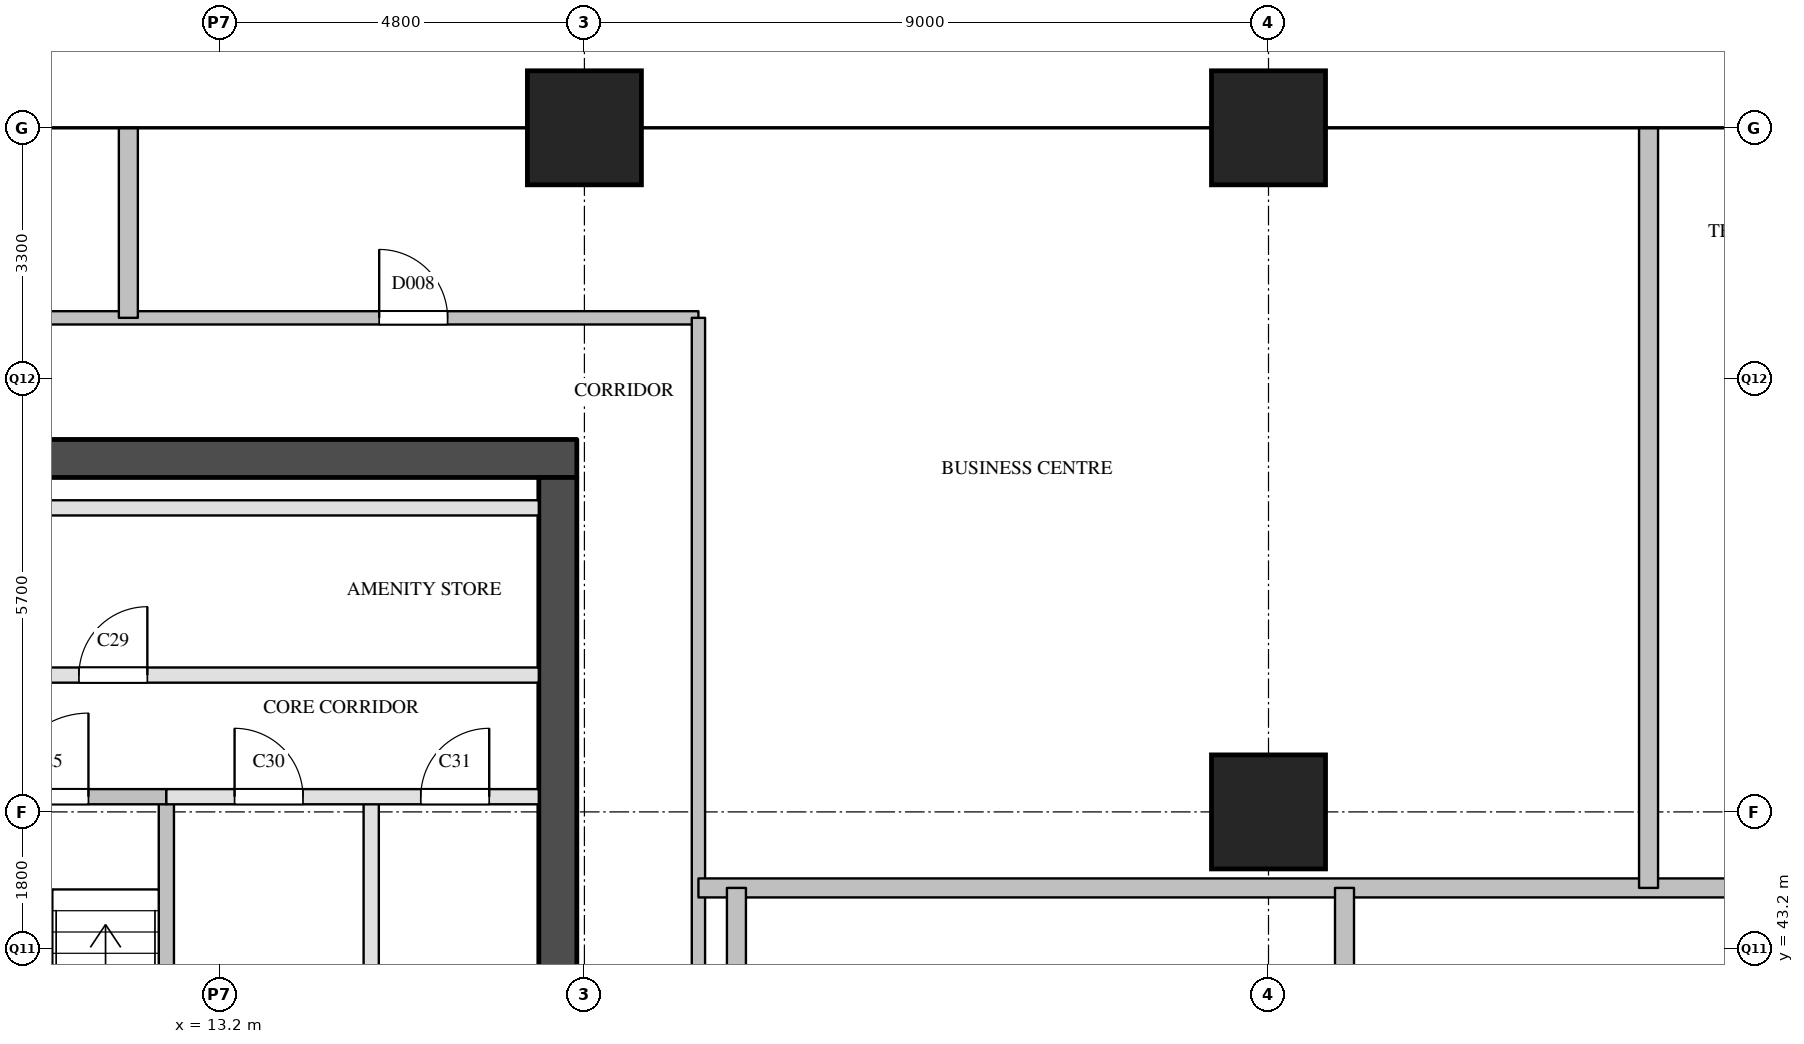
"""IFC4 building model, lengths in metres.
Left out: names, types, materials, properties, quantities, classifications, styles, units other than length and angle.
Written with IfcOpenShell. Run it as: python <this file> out.ifc"""

import sys

from ifc_helpers import new_model, si_unit, direction, frame, frame_2d, origin, origin_2d, place, context, subcontext, project, spatial, rectangle, extrude, element, fill, save


model = new_model("IFC4")
c1 = context("Model", 3, precision=1e-05, world=origin(), true_north=direction((0.0, 1.0)))
c2 = subcontext(c1, "Body", "Model", "MODEL_VIEW")
j1 = project(units=[si_unit("LENGTHUNIT", "METRE"), si_unit("PLANEANGLEUNIT", "RADIAN")], contexts=[c1])
p1 = place(None, origin())
s1 = spatial("IfcSite", under=j1, at=p1, CompositionType="ELEMENT")
p2 = place(p1, origin())
s2 = spatial("IfcBuilding", under=s1, at=p2, CompositionType="ELEMENT")
p3 = place(p2, frame((0.0, 0.0, 138.8)))
s3 = spatial("IfcBuildingStorey", under=s2, at=p3, CompositionType="ELEMENT", Elevation=138.8)
for number, where, z_axis, x_axis in (
    (1, (18.0, 54.0, 0.0), (0.0, 0.0, 1.0), (1.0, 0.0, 0.0)),
    (2, (27.0, 45.0, 0.0), (0.0, 0.0, 1.0), (1.0, 0.0, 0.0)),
    (3, (27.0, 54.0, 0.0), (0.0, 0.0, 1.0), (1.0, 0.0, 0.0)),
):
    element("IfcColumn", number, at=place(p3, frame(where, z_axis=z_axis, x_axis=x_axis)), inside=s3, PredefinedType="COLUMN", context=c2, shape_type="SweptSolid", body=[
        extrude(rectangle(XDim=1.5, YDim=1.5, at=origin_2d()), origin(), (0.0, 0.0, 1.0), 3.9),
    ])
p4 = place(p3, frame((5.7, 49.65, 0.0), z_axis=(0.0, 0.0, 1.0), x_axis=(1.0, 0.0, 0.0)))
e4 = element("IfcWall", 4, at=p4, inside=s3, PredefinedType="SHEAR", context=c2, shape_type="SweptSolid", body=[
    extrude(rectangle(XDim=12.2, YDim=0.5, at=frame_2d((6.1, 0.0))), origin(), (0.0, 0.0, 1.0), 3.6),
])
p5 = place(p3, frame((17.65, 29.1, 0.0), z_axis=(0.0, 0.0, 1.0), x_axis=(0.0, 1.0, 0.0)))
e5 = element("IfcWall", 5, at=p5, inside=s3, PredefinedType="SHEAR", context=c2, shape_type="SweptSolid", body=[
    extrude(rectangle(XDim=20.3, YDim=0.5, at=frame_2d((10.15, 0.0))), origin(), (0.0, 0.0, 1.0), 3.6),
])
p6 = place(p5, frame((1.25, 0.0, 0.0)))
e6 = element("IfcOpeningElement", 6, at=p6, cuts=e5, PredefinedType="OPENING", context=c2, shape_type="SweptSolid", body=[
    extrude(rectangle(XDim=0.7, YDim=2.1, at=frame_2d((0.35, 1.05))), frame((0.0, 0.26, 0.0), z_axis=(0.0, -1.0, 0.0), x_axis=(1.0, 0.0, 0.0)), (0.0, 0.0, 1.0), 0.52),
])
p7 = place(p5, frame((7.05, 0.0, 0.0)))
e7 = element("IfcOpeningElement", 7, at=p7, cuts=e5, PredefinedType="OPENING", context=c2, shape_type="SweptSolid", body=[
    extrude(rectangle(XDim=0.7, YDim=2.1, at=frame_2d((0.35, 1.05))), frame((0.0, 0.26, 0.0), z_axis=(0.0, -1.0, 0.0), x_axis=(1.0, 0.0, 0.0)), (0.0, 0.0, 1.0), 0.52),
])
p8 = place(p5, frame((3.6, 0.0, 0.0)))
e8 = element("IfcOpeningElement", 8, at=p8, cuts=e5, PredefinedType="OPENING", context=c2, shape_type="SweptSolid", body=[
    extrude(rectangle(XDim=1.8, YDim=2.1, at=frame_2d((0.9, 1.05))), frame((0.0, 0.26, 0.0), z_axis=(0.0, -1.0, 0.0), x_axis=(1.0, 0.0, 0.0)), (0.0, 0.0, 1.0), 0.52),
])
p9 = place(p3, frame((12.5, 40.9, 0.0), z_axis=(0.0, 0.0, 1.0), x_axis=(0.0, 1.0, 0.0)))
e9 = element("IfcWall", 9, at=p9, inside=s3, PredefinedType="SOLIDWALL", context=c2, shape_type="SweptSolid", body=[
    extrude(rectangle(XDim=4.3, YDim=0.2, at=frame_2d((2.15, 0.0))), origin(), (0.0, 0.0, 1.0), 3.6),
])
p10 = place(p3, frame((15.195, 39.0, 0.0), z_axis=(0.0, 0.0, 1.0), x_axis=(0.0, 1.0, 0.0)))
e10 = element("IfcWall", 10, at=p10, inside=s3, PredefinedType="PARTITIONING", context=c2, shape_type="SweptSolid", body=[
    extrude(rectangle(XDim=6.2, YDim=0.2, at=frame_2d((3.1, 0.0))), origin(), (0.0, 0.0, 1.0), 3.6),
])
p11 = place(p3, frame((12.5, 45.2, 0.0), z_axis=(0.0, 0.0, 1.0), x_axis=(1.0, 0.0, 0.0)))
e11 = element("IfcWall", 11, at=p11, inside=s3, PredefinedType="PARTITIONING", context=c2, shape_type="SweptSolid", body=[
    extrude(rectangle(XDim=4.9, YDim=0.2, at=frame_2d((2.45, 0.0))), origin(), (0.0, 0.0, 1.0), 3.6),
])
p12 = place(p11, frame((0.897, 0.0, 0.0)))
e12 = element("IfcOpeningElement", 12, at=p12, cuts=e11, PredefinedType="OPENING", context=c2, shape_type="SweptSolid", body=[
    extrude(rectangle(XDim=0.9, YDim=2.1, at=frame_2d((0.45, 1.05))), frame((0.0, 0.11, 0.0), z_axis=(0.0, -1.0, 0.0), x_axis=(1.0, 0.0, 0.0)), (0.0, 0.0, 1.0), 0.22),
])
p13 = place(p11, frame((3.347, 0.0, 0.0)))
e13 = element("IfcOpeningElement", 13, at=p13, cuts=e11, PredefinedType="OPENING", context=c2, shape_type="SweptSolid", body=[
    extrude(rectangle(XDim=0.9, YDim=2.1, at=frame_2d((0.45, 1.05))), frame((0.0, 0.11, 0.0), z_axis=(0.0, -1.0, 0.0), x_axis=(1.0, 0.0, 0.0)), (0.0, 0.0, 1.0), 0.22),
])
p14 = place(p3, frame((6.2, 45.2, 0.0), z_axis=(0.0, 0.0, 1.0), x_axis=(1.0, 0.0, 0.0)))
e14 = element("IfcWall", 14, at=p14, inside=s3, PredefinedType="SOLIDWALL", context=c2, shape_type="SweptSolid", body=[
    extrude(rectangle(XDim=6.3, YDim=0.2, at=frame_2d((3.15, 0.0))), origin(), (0.0, 0.0, 1.0), 3.6),
])
p15 = place(p14, frame((1.025, 0.0, 0.0)))
e15 = element("IfcOpeningElement", 15, at=p15, cuts=e14, PredefinedType="OPENING", context=c2, shape_type="SweptSolid", body=[
    extrude(rectangle(XDim=1.1, YDim=2.1, at=frame_2d((0.55, 1.05))), frame((0.0, 0.11, 0.0), z_axis=(0.0, -1.0, 0.0), x_axis=(1.0, 0.0, 0.0)), (0.0, 0.0, 1.0), 0.22),
])
p16 = place(p14, frame((4.175, 0.0, 0.0)))
e16 = element("IfcOpeningElement", 16, at=p16, cuts=e14, PredefinedType="OPENING", context=c2, shape_type="SweptSolid", body=[
    extrude(rectangle(XDim=1.1, YDim=2.1, at=frame_2d((0.55, 1.05))), frame((0.0, 0.11, 0.0), z_axis=(0.0, -1.0, 0.0), x_axis=(1.0, 0.0, 0.0)), (0.0, 0.0, 1.0), 0.22),
])
p17 = place(p3, frame((6.2, 46.8, 0.0), z_axis=(0.0, 0.0, 1.0), x_axis=(1.0, 0.0, 0.0)))
e17 = element("IfcWall", 17, at=p17, inside=s3, PredefinedType="PARTITIONING", context=c2, shape_type="SweptSolid", body=[
    extrude(rectangle(XDim=11.2, YDim=0.2, at=frame_2d((5.6, 0.0))), origin(), (0.0, 0.0, 1.0), 3.6),
])
p18 = place(p17, frame((5.15, 0.0, 0.0)))
e18 = element("IfcOpeningElement", 18, at=p18, cuts=e17, PredefinedType="OPENING", context=c2, shape_type="SweptSolid", body=[
    extrude(rectangle(XDim=0.9, YDim=2.1, at=frame_2d((0.45, 1.05))), frame((0.0, 0.11, 0.0), z_axis=(0.0, -1.0, 0.0), x_axis=(1.0, 0.0, 0.0)), (0.0, 0.0, 1.0), 0.22),
])
p19 = place(p3, frame((6.2, 49.0, 0.0), z_axis=(0.0, 0.0, 1.0), x_axis=(1.0, 0.0, 0.0)))
e19 = element("IfcWall", 19, at=p19, inside=s3, PredefinedType="PARTITIONING", context=c2, shape_type="SweptSolid", body=[
    extrude(rectangle(XDim=11.2, YDim=0.2, at=frame_2d((5.6, 0.0))), origin(), (0.0, 0.0, 1.0), 3.6),
])
p20 = place(p3, frame((4.1, 51.5, 0.0), z_axis=(0.0, 0.0, 1.0), x_axis=(1.0, 0.0, 0.0)))
e20 = element("IfcWall", 20, at=p20, inside=s3, PredefinedType="PARTITIONING", context=c2, shape_type="SweptSolid", body=[
    extrude(rectangle(XDim=15.4, YDim=0.175, at=frame_2d((7.7, 0.0))), origin(), (0.0, 0.0, 1.0), 3.6),
])
p21 = place(p20, frame((11.2, 0.0, 0.0)))
e21 = element("IfcOpeningElement", 21, at=p21, cuts=e20, PredefinedType="OPENING", context=c2, shape_type="SweptSolid", body=[
    extrude(rectangle(XDim=0.9, YDim=2.1, at=frame_2d((0.45, 1.05))), frame((0.0, 0.097, 0.0), z_axis=(0.0, -1.0, 0.0), x_axis=(1.0, 0.0, 0.0)), (0.0, 0.0, 1.0), 0.195),
])
p22 = place(p3, frame((19.5, 28.5, 0.0), z_axis=(0.0, 0.0, 1.0), x_axis=(0.0, 1.0, 0.0)))
e22 = element("IfcWall", 22, at=p22, inside=s3, PredefinedType="PARTITIONING", context=c2, shape_type="SweptSolid", body=[
    extrude(rectangle(XDim=23.0, YDim=0.175, at=frame_2d((11.5, 0.0))), origin(), (0.0, 0.0, 1.0), 3.6),
])
p23 = place(p3, frame((19.5, 44.0, 0.0), z_axis=(0.0, 0.0, 1.0), x_axis=(1.0, 0.0, 0.0)))
e23 = element("IfcWall", 23, at=p23, inside=s3, PredefinedType="PARTITIONING", context=c2, shape_type="SweptSolid", body=[
    extrude(rectangle(XDim=15.0, YDim=0.25, at=frame_2d((7.5, 0.0))), origin(), (0.0, 0.0, 1.0), 2.6),
])
p24 = place(p3, frame((12.0, 51.5, 0.0), z_axis=(0.0, 0.0, 1.0), x_axis=(0.0, 1.0, 0.0)))
e24 = element("IfcWall", 24, at=p24, inside=s3, PredefinedType="PARTITIONING", context=c2, shape_type="SweptSolid", body=[
    extrude(rectangle(XDim=2.5, YDim=0.25, at=frame_2d((1.25, 0.0))), origin(), (0.0, 0.0, 1.0), 2.6),
])
p25 = place(p3, frame((20.0, 27.0, 0.0), z_axis=(0.0, 0.0, 1.0), x_axis=(0.0, 1.0, 0.0)))
e25 = element("IfcWall", 25, at=p25, inside=s3, PredefinedType="PARTITIONING", context=c2, shape_type="SweptSolid", body=[
    extrude(rectangle(XDim=17.0, YDim=0.25, at=frame_2d((8.5, 0.0))), origin(), (0.0, 0.0, 1.0), 2.6),
])
p26 = place(p3, frame((28.0, 35.875, 0.0), z_axis=(0.0, 0.0, 1.0), x_axis=(0.0, 1.0, 0.0)))
e26 = element("IfcWall", 26, at=p26, inside=s3, PredefinedType="PARTITIONING", context=c2, shape_type="SweptSolid", body=[
    extrude(rectangle(XDim=8.125, YDim=0.25, at=frame_2d((4.062, 0.0))), origin(), (0.0, 0.0, 1.0), 3.6),
])
p27 = place(p3, frame((32.0, 44.0, 0.0), z_axis=(0.0, 0.0, 1.0), x_axis=(0.0, 1.0, 0.0)))
e27 = element("IfcWall", 27, at=p27, inside=s3, PredefinedType="PARTITIONING", context=c2, shape_type="SweptSolid", body=[
    extrude(rectangle(XDim=10.0, YDim=0.25, at=frame_2d((5.0, 0.0))), origin(), (0.0, 0.0, 1.0), 2.6),
])
p28 = place(p16, origin())
e28 = element("IfcDoor", 28, at=p28, inside=s3, OperationType="SINGLE_SWING_RIGHT", PredefinedType="DOOR", context=c2, shape_type="SweptSolid", body=[
    extrude(rectangle(XDim=1.1, YDim=2.1, at=frame_2d((0.55, 1.05))), frame((0.0, 0.025, 0.0), z_axis=(0.0, -1.0, 0.0), x_axis=(1.0, 0.0, 0.0)), (0.0, 0.0, 1.0), 0.05),
])
fill(e16, e28)
p29 = place(p18, origin())
e29 = element("IfcDoor", 29, at=p29, inside=s3, OperationType="SINGLE_SWING_RIGHT", PredefinedType="DOOR", context=c2, shape_type="SweptSolid", body=[
    extrude(rectangle(XDim=0.9, YDim=2.1, at=frame_2d((0.45, 1.05))), frame((0.0, 0.025, 0.0), z_axis=(0.0, -1.0, 0.0), x_axis=(1.0, 0.0, 0.0)), (0.0, 0.0, 1.0), 0.05),
])
fill(e18, e29)
p30 = place(p12, origin())
e30 = element("IfcDoor", 30, at=p30, inside=s3, OperationType="SINGLE_SWING_LEFT", PredefinedType="DOOR", context=c2, shape_type="SweptSolid", body=[
    extrude(rectangle(XDim=0.9, YDim=2.1, at=frame_2d((0.45, 1.05))), frame((0.0, 0.025, 0.0), z_axis=(0.0, -1.0, 0.0), x_axis=(1.0, 0.0, 0.0)), (0.0, 0.0, 1.0), 0.05),
])
fill(e12, e30)
p31 = place(p13, origin())
e31 = element("IfcDoor", 31, at=p31, inside=s3, OperationType="SINGLE_SWING_RIGHT", PredefinedType="DOOR", context=c2, shape_type="SweptSolid", body=[
    extrude(rectangle(XDim=0.9, YDim=2.1, at=frame_2d((0.45, 1.05))), frame((0.0, 0.025, 0.0), z_axis=(0.0, -1.0, 0.0), x_axis=(1.0, 0.0, 0.0)), (0.0, 0.0, 1.0), 0.05),
])
fill(e13, e31)
p32 = place(p21, origin())
e32 = element("IfcDoor", 32, at=p32, inside=s3, OperationType="SINGLE_SWING_LEFT", PredefinedType="DOOR", context=c2, shape_type="SweptSolid", body=[
    extrude(rectangle(XDim=0.9, YDim=2.1, at=frame_2d((0.45, 1.05))), frame((0.0, 0.025, 0.0), z_axis=(0.0, -1.0, 0.0), x_axis=(1.0, 0.0, 0.0)), (0.0, 0.0, 1.0), 0.05),
])
fill(e21, e32)
save(model, sys.argv[1])
